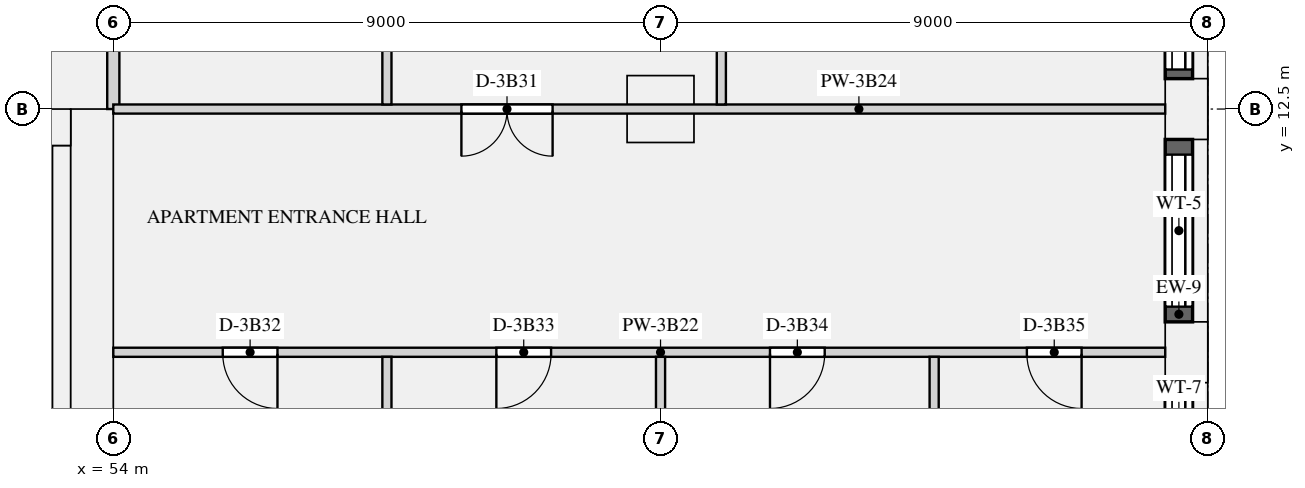
"""IFC4 building model, lengths in metres.
Left out: names, types, materials, properties, quantities, classifications, styles, units other than length and angle.
Written with IfcOpenShell. Run it as: python <this file> out.ifc"""

import sys

from ifc_helpers import new_model, si_unit, direction, frame, frame_2d, origin, origin_2d, place, context, subcontext, project, spatial, rectangle, extrude, element, fill, save


model = new_model("IFC4")
c1 = context("Model", 3, precision=1e-05, world=origin(), true_north=direction((0.0, 1.0)))
c2 = subcontext(c1, "Body", "Model", "MODEL_VIEW")
j1 = project(units=[si_unit("LENGTHUNIT", "METRE"), si_unit("PLANEANGLEUNIT", "RADIAN")], contexts=[c1])
p1 = place(None, origin())
s1 = spatial("IfcSite", under=j1, at=p1, CompositionType="ELEMENT")
p2 = place(p1, origin())
s2 = spatial("IfcBuilding", under=s1, at=p2, CompositionType="ELEMENT")
p3 = place(p2, frame((0.0, 0.0, 150.75)))
s3 = spatial("IfcBuildingStorey", under=s2, at=p3, CompositionType="ELEMENT", Elevation=150.75)
for number, where, z_axis, x_axis in (
    (1, (71.65, 8.5, 0.0), (0.0, 0.0, 1.0), (0.0, 1.0, 0.0)),
    (2, (71.65, 12.5, 0.0), (0.0, 0.0, 1.0), (0.0, 1.0, 0.0)),
):
    element("IfcColumn", number, at=place(p3, frame(where, z_axis=z_axis, x_axis=x_axis)), inside=s3, PredefinedType="USERDEFINED", context=c2, shape_type="SweptSolid", body=[
        extrude(rectangle(XDim=1.0, YDim=0.7, at=origin_2d()), origin(), (0.0, 0.0, 1.0), 3.15),
    ])
p4 = place(p3, frame((63.0, 12.5, 0.0), z_axis=(0.0, 0.0, 1.0), x_axis=(1.0, 0.0, 0.0)))
e3 = element("IfcColumn", 3, at=p4, inside=s3, PredefinedType="COLUMN", context=c2, shape_type="SweptSolid", body=[
    extrude(rectangle(XDim=1.1, YDim=1.1, at=origin_2d()), origin(), (0.0, 0.0, 1.0), 3.15),
])
p5 = place(p3, frame((53.65, 0.0, 0.0), z_axis=(0.0, 0.0, 1.0), x_axis=(0.0, 1.0, 0.0)))
e4 = element("IfcWall", 4, at=p5, inside=s3, PredefinedType="SHEAR", context=c2, shape_type="SweptSolid", body=[
    extrude(rectangle(XDim=12.5, YDim=0.7, at=frame_2d((6.25, 0.0))), origin(), (0.0, 0.0, 1.0), 3.15),
])
p6 = place(p3, frame((18.7, 12.2, 0.0), z_axis=(0.0, 0.0, 1.0), x_axis=(1.0, 0.0, 0.0)))
e5 = element("IfcWall", 5, at=p6, inside=s3, PredefinedType="SHEAR", context=c2, shape_type="SweptSolid", body=[
    extrude(rectangle(XDim=34.6, YDim=0.6, at=frame_2d((17.3, 0.0))), origin(), (0.0, 0.0, 1.0), 3.15),
])
p7 = place(p6, frame((24.475, 0.0, 0.0)))
e6 = element("IfcOpeningElement", 6, at=p7, cuts=e5, PredefinedType="OPENING", context=c2, shape_type="SweptSolid", body=[
    extrude(rectangle(XDim=1.1, YDim=2.1, at=frame_2d((0.55, 1.05))), frame((0.0, 0.31, 0.0), z_axis=(0.0, -1.0, 0.0), x_axis=(1.0, 0.0, 0.0)), (0.0, 0.0, 1.0), 0.62),
])
p8 = place(p6, frame((26.725, 0.0, 0.0)))
e7 = element("IfcOpeningElement", 7, at=p8, cuts=e5, PredefinedType="OPENING", context=c2, shape_type="SweptSolid", body=[
    extrude(rectangle(XDim=1.1, YDim=2.1, at=frame_2d((0.55, 1.05))), frame((0.0, 0.31, 0.0), z_axis=(0.0, -1.0, 0.0), x_axis=(1.0, 0.0, 0.0)), (0.0, 0.0, 1.0), 0.62),
])
p9 = place(p6, frame((28.975, 0.0, 0.0)))
e8 = element("IfcOpeningElement", 8, at=p9, cuts=e5, PredefinedType="OPENING", context=c2, shape_type="SweptSolid", body=[
    extrude(rectangle(XDim=1.1, YDim=2.1, at=frame_2d((0.55, 1.05))), frame((0.0, 0.31, 0.0), z_axis=(0.0, -1.0, 0.0), x_axis=(1.0, 0.0, 0.0)), (0.0, 0.0, 1.0), 0.62),
])
p10 = place(p6, frame((4.85, 0.0, 0.0)))
e9 = element("IfcOpeningElement", 9, at=p10, cuts=e5, PredefinedType="OPENING", context=c2, shape_type="SweptSolid", body=[
    extrude(rectangle(XDim=0.9, YDim=2.1, at=frame_2d((0.45, 1.05))), frame((0.0, 0.31, 0.0), z_axis=(0.0, -1.0, 0.0), x_axis=(1.0, 0.0, 0.0)), (0.0, 0.0, 1.0), 0.62),
])
p11 = place(p6, frame((18.35, 0.0, 0.0)))
e10 = element("IfcOpeningElement", 10, at=p11, cuts=e5, PredefinedType="OPENING", context=c2, shape_type="SweptSolid", body=[
    extrude(rectangle(XDim=0.9, YDim=2.1, at=frame_2d((0.45, 1.05))), frame((0.0, 0.31, 0.0), z_axis=(0.0, -1.0, 0.0), x_axis=(1.0, 0.0, 0.0)), (0.0, 0.0, 1.0), 0.62),
])
p12 = place(p6, frame((1.45, 0.0, 0.0)))
e11 = element("IfcOpeningElement", 11, at=p12, cuts=e5, PredefinedType="OPENING", context=c2, shape_type="SweptSolid", body=[
    extrude(rectangle(XDim=1.2, YDim=2.1, at=frame_2d((0.6, 1.05))), frame((0.0, 0.31, 0.0), z_axis=(0.0, -1.0, 0.0), x_axis=(1.0, 0.0, 0.0)), (0.0, 0.0, 1.0), 0.62),
])
p13 = place(p6, frame((31.95, 0.0, 0.0)))
e12 = element("IfcOpeningElement", 12, at=p13, cuts=e5, PredefinedType="OPENING", context=c2, shape_type="SweptSolid", body=[
    extrude(rectangle(XDim=1.2, YDim=2.1, at=frame_2d((0.6, 1.05))), frame((0.0, 0.31, 0.0), z_axis=(0.0, -1.0, 0.0), x_axis=(1.0, 0.0, 0.0)), (0.0, 0.0, 1.0), 0.62),
])
p14 = place(p3, frame((53.15, 1.0, 0.0), z_axis=(0.0, 0.0, 1.0), x_axis=(0.0, 1.0, 0.0)))
e13 = element("IfcWall", 13, at=p14, inside=s3, PredefinedType="SHEAR", context=c2, shape_type="SweptSolid", body=[
    extrude(rectangle(XDim=10.9, YDim=0.3, at=frame_2d((5.45, 0.0))), origin(), (0.0, 0.0, 1.0), 3.15),
])
p15 = place(p3, frame((71.525, 5.5, 0.9), z_axis=(0.0, 0.0, 1.0), x_axis=(0.0, 1.0, 0.0)))
e14 = element("IfcWall", 14, at=p15, inside=s3, PredefinedType="SOLIDWALL", context=c2, shape_type="SweptSolid", body=[
    extrude(rectangle(XDim=2.5, YDim=0.45, at=frame_2d((1.25, 0.0))), origin(), (0.0, 0.0, 1.0), 1.93),
])
p16 = place(p15, frame((0.25, 0.0, 0.15)))
e15 = element("IfcOpeningElement", 15, at=p16, cuts=e14, PredefinedType="OPENING", context=c2, shape_type="SweptSolid", body=[
    extrude(rectangle(XDim=2.0, YDim=1.5, at=frame_2d((1.0, 0.75))), frame((0.0, 0.235, 0.0), z_axis=(0.0, -1.0, 0.0), x_axis=(1.0, 0.0, 0.0)), (0.0, 0.0, 1.0), 0.47),
])
p17 = place(p3, frame((71.525, 9.0, 0.9), z_axis=(0.0, 0.0, 1.0), x_axis=(0.0, 1.0, 0.0)))
e16 = element("IfcWall", 16, at=p17, inside=s3, PredefinedType="SOLIDWALL", context=c2, shape_type="SweptSolid", body=[
    extrude(rectangle(XDim=3.0, YDim=0.45, at=frame_2d((1.5, 0.0))), origin(), (0.0, 0.0, 1.0), 1.93),
])
p18 = place(p17, frame((0.25, 0.0, 0.15)))
e17 = element("IfcOpeningElement", 17, at=p18, cuts=e16, PredefinedType="OPENING", context=c2, shape_type="SweptSolid", body=[
    extrude(rectangle(XDim=2.5, YDim=1.5, at=frame_2d((1.25, 0.75))), frame((0.0, 0.235, 0.0), z_axis=(0.0, -1.0, 0.0), x_axis=(1.0, 0.0, 0.0)), (0.0, 0.0, 1.0), 0.47),
])
p19 = place(p3, frame((71.525, 13.0, 0.9), z_axis=(0.0, 0.0, 1.0), x_axis=(0.0, 1.0, 0.0)))
e18 = element("IfcWall", 18, at=p19, inside=s3, PredefinedType="SOLIDWALL", context=c2, shape_type="SweptSolid", body=[
    extrude(rectangle(XDim=2.8, YDim=0.45, at=frame_2d((1.4, 0.0))), origin(), (0.0, 0.0, 1.0), 1.93),
])
p20 = place(p19, frame((0.15, 0.0, 0.15)))
e19 = element("IfcOpeningElement", 19, at=p20, cuts=e18, PredefinedType="OPENING", context=c2, shape_type="SweptSolid", body=[
    extrude(rectangle(XDim=2.5, YDim=1.5, at=frame_2d((1.25, 0.75))), frame((0.0, 0.235, 0.0), z_axis=(0.0, -1.0, 0.0), x_axis=(1.0, 0.0, 0.0)), (0.0, 0.0, 1.0), 0.47),
])
p21 = place(p3, frame((54.0, 12.5, 0.0), z_axis=(0.0, 0.0, 1.0), x_axis=(0.0, 1.0, 0.0)))
e20 = element("IfcWall", 20, at=p21, inside=s3, PredefinedType="PARTITIONING", context=c2, shape_type="SweptSolid", body=[
    extrude(rectangle(XDim=3.4, YDim=0.2, at=frame_2d((1.7, 0.0))), origin(), (0.0, 0.0, 1.0), 2.83),
])
p22 = place(p3, frame((54.0, 8.5, 0.0), z_axis=(0.0, 0.0, 1.0), x_axis=(1.0, 0.0, 0.0)))
e21 = element("IfcWall", 21, at=p22, inside=s3, PredefinedType="PARTITIONING", context=c2, shape_type="SweptSolid", body=[
    extrude(rectangle(XDim=17.3, YDim=0.15, at=frame_2d((8.65, 0.0))), origin(), (0.0, 0.0, 1.0), 2.83),
])
p23 = place(p22, frame((1.8, 0.0, 0.0)))
e22 = element("IfcOpeningElement", 22, at=p23, cuts=e21, PredefinedType="OPENING", context=c2, shape_type="SweptSolid", body=[
    extrude(rectangle(XDim=0.9, YDim=2.1, at=frame_2d((0.45, 1.05))), frame((0.0, 0.085, 0.0), z_axis=(0.0, -1.0, 0.0), x_axis=(1.0, 0.0, 0.0)), (0.0, 0.0, 1.0), 0.17),
])
p24 = place(p22, frame((6.3, 0.0, 0.0)))
e23 = element("IfcOpeningElement", 23, at=p24, cuts=e21, PredefinedType="OPENING", context=c2, shape_type="SweptSolid", body=[
    extrude(rectangle(XDim=0.9, YDim=2.1, at=frame_2d((0.45, 1.05))), frame((0.0, 0.085, 0.0), z_axis=(0.0, -1.0, 0.0), x_axis=(1.0, 0.0, 0.0)), (0.0, 0.0, 1.0), 0.17),
])
p25 = place(p22, frame((10.8, 0.0, 0.0)))
e24 = element("IfcOpeningElement", 24, at=p25, cuts=e21, PredefinedType="OPENING", context=c2, shape_type="SweptSolid", body=[
    extrude(rectangle(XDim=0.9, YDim=2.1, at=frame_2d((0.45, 1.05))), frame((0.0, 0.085, 0.0), z_axis=(0.0, -1.0, 0.0), x_axis=(1.0, 0.0, 0.0)), (0.0, 0.0, 1.0), 0.17),
])
p26 = place(p22, frame((15.025, 0.0, 0.0)))
e25 = element("IfcOpeningElement", 25, at=p26, cuts=e21, PredefinedType="OPENING", context=c2, shape_type="SweptSolid", body=[
    extrude(rectangle(XDim=0.9, YDim=2.1, at=frame_2d((0.45, 1.05))), frame((0.0, 0.085, 0.0), z_axis=(0.0, -1.0, 0.0), x_axis=(1.0, 0.0, 0.0)), (0.0, 0.0, 1.0), 0.17),
])
p27 = place(p3, frame((54.0, 12.5, 0.0), z_axis=(0.0, 0.0, 1.0), x_axis=(1.0, 0.0, 0.0)))
e26 = element("IfcWall", 26, at=p27, inside=s3, PredefinedType="PARTITIONING", context=c2, shape_type="SweptSolid", body=[
    extrude(rectangle(XDim=17.3, YDim=0.15, at=frame_2d((8.65, 0.0))), origin(), (0.0, 0.0, 1.0), 2.83),
])
p28 = place(p27, frame((5.725, 0.0, 0.0)))
e27 = element("IfcOpeningElement", 27, at=p28, cuts=e26, PredefinedType="OPENING", context=c2, shape_type="SweptSolid", body=[
    extrude(rectangle(XDim=1.5, YDim=2.1, at=frame_2d((0.75, 1.05))), frame((0.0, 0.085, 0.0), z_axis=(0.0, -1.0, 0.0), x_axis=(1.0, 0.0, 0.0)), (0.0, 0.0, 1.0), 0.17),
])
p29 = place(p3, frame((63.0, 0.7, 0.0), z_axis=(0.0, 0.0, 1.0), x_axis=(0.0, 1.0, 0.0)))
e28 = element("IfcWall", 28, at=p29, inside=s3, PredefinedType="PARTITIONING", context=c2, shape_type="SweptSolid", body=[
    extrude(rectangle(XDim=7.725, YDim=0.15, at=frame_2d((3.863, 0.0))), origin(), (0.0, 0.0, 1.0), 2.83),
])
p30 = place(p3, frame((64.0, 12.575, 0.0), z_axis=(0.0, 0.0, 1.0), x_axis=(0.0, 1.0, 0.0)))
e29 = element("IfcWall", 29, at=p30, inside=s3, PredefinedType="PARTITIONING", context=c2, shape_type="SweptSolid", body=[
    extrude(rectangle(XDim=22.85, YDim=0.15, at=frame_2d((11.425, 0.0))), origin(), (0.0, 0.0, 1.0), 2.83),
])
p31 = place(p30, frame((16.55, 0.0, 0.0)))
e30 = element("IfcOpeningElement", 30, at=p31, cuts=e29, PredefinedType="OPENING", context=c2, shape_type="SweptSolid", body=[
    extrude(rectangle(XDim=1.5, YDim=2.1, at=frame_2d((0.75, 1.05))), frame((0.0, 0.085, 0.0), z_axis=(0.0, -1.0, 0.0), x_axis=(1.0, 0.0, 0.0)), (0.0, 0.0, 1.0), 0.17),
])
p32 = place(p30, frame((4.925, 0.0, 0.0)))
e31 = element("IfcOpeningElement", 31, at=p32, cuts=e29, PredefinedType="OPENING", context=c2, shape_type="SweptSolid", body=[
    extrude(rectangle(XDim=1.5, YDim=2.1, at=frame_2d((0.75, 1.05))), frame((0.0, 0.085, 0.0), z_axis=(0.0, -1.0, 0.0), x_axis=(1.0, 0.0, 0.0)), (0.0, 0.0, 1.0), 0.17),
])
p33 = place(p3, frame((58.5, 0.7, 0.0), z_axis=(0.0, 0.0, 1.0), x_axis=(0.0, 1.0, 0.0)))
e32 = element("IfcWall", 32, at=p33, inside=s3, PredefinedType="PARTITIONING", context=c2, shape_type="SweptSolid", body=[
    extrude(rectangle(XDim=7.725, YDim=0.15, at=frame_2d((3.863, 0.0))), origin(), (0.0, 0.0, 1.0), 2.83),
])
p34 = place(p3, frame((58.5, 12.575, 0.0), z_axis=(0.0, 0.0, 1.0), x_axis=(0.0, 1.0, 0.0)))
e33 = element("IfcWall", 33, at=p34, inside=s3, PredefinedType="PARTITIONING", context=c2, shape_type="SweptSolid", body=[
    extrude(rectangle(XDim=10.325, YDim=0.15, at=frame_2d((5.163, 0.0))), origin(), (0.0, 0.0, 1.0), 2.83),
])
p35 = place(p34, frame((6.75, 0.0, 0.0)))
e34 = element("IfcOpeningElement", 34, at=p35, cuts=e33, PredefinedType="OPENING", context=c2, shape_type="SweptSolid", body=[
    extrude(rectangle(XDim=0.9, YDim=2.1, at=frame_2d((0.45, 1.05))), frame((0.0, 0.085, 0.0), z_axis=(0.0, -1.0, 0.0), x_axis=(1.0, 0.0, 0.0)), (0.0, 0.0, 1.0), 0.17),
])
p36 = place(p34, frame((1.475, 0.0, 0.0)))
e35 = element("IfcOpeningElement", 35, at=p36, cuts=e33, PredefinedType="OPENING", context=c2, shape_type="SweptSolid", body=[
    extrude(rectangle(XDim=0.9, YDim=2.1, at=frame_2d((0.45, 1.05))), frame((0.0, 0.085, 0.0), z_axis=(0.0, -1.0, 0.0), x_axis=(1.0, 0.0, 0.0)), (0.0, 0.0, 1.0), 0.17),
])
p37 = place(p3, frame((67.5, 5.2, 0.0), z_axis=(0.0, 0.0, 1.0), x_axis=(0.0, 1.0, 0.0)))
e36 = element("IfcWall", 36, at=p37, inside=s3, PredefinedType="PARTITIONING", context=c2, shape_type="SweptSolid", body=[
    extrude(rectangle(XDim=3.225, YDim=0.15, at=frame_2d((1.613, 0.0))), origin(), (0.0, 0.0, 1.0), 2.83),
])
p38 = place(p16, origin())
e37 = element("IfcWindow", 37, at=p38, inside=s3, PartitioningType="SINGLE_PANEL", PredefinedType="WINDOW", context=c2, shape_type="SweptSolid", body=[
    extrude(rectangle(XDim=2.0, YDim=1.5, at=frame_2d((1.0, 0.75))), frame((0.0, -0.065, 0.0), z_axis=(0.0, -1.0, 0.0), x_axis=(1.0, 0.0, 0.0)), (0.0, 0.0, 1.0), 0.06),
])
fill(e15, e37)
p39 = place(p18, origin())
e38 = element("IfcWindow", 38, at=p39, inside=s3, PartitioningType="SINGLE_PANEL", PredefinedType="WINDOW", context=c2, shape_type="SweptSolid", body=[
    extrude(rectangle(XDim=2.5, YDim=1.5, at=frame_2d((1.25, 0.75))), frame((0.0, -0.065, 0.0), z_axis=(0.0, -1.0, 0.0), x_axis=(1.0, 0.0, 0.0)), (0.0, 0.0, 1.0), 0.06),
])
fill(e17, e38)
p40 = place(p20, origin())
e39 = element("IfcWindow", 39, at=p40, inside=s3, PartitioningType="SINGLE_PANEL", PredefinedType="WINDOW", context=c2, shape_type="SweptSolid", body=[
    extrude(rectangle(XDim=2.5, YDim=1.5, at=frame_2d((1.25, 0.75))), frame((0.0, -0.065, 0.0), z_axis=(0.0, -1.0, 0.0), x_axis=(1.0, 0.0, 0.0)), (0.0, 0.0, 1.0), 0.06),
])
fill(e19, e39)
p41 = place(p28, frame((1.5, 0.0, 0.0), z_axis=(0.0, 0.0, 1.0), x_axis=(-1.0, 0.0, 0.0)))
e40 = element("IfcDoor", 40, at=p41, inside=s3, OperationType="DOUBLE_DOOR_SINGLE_SWING", PredefinedType="DOOR", context=c2, shape_type="SweptSolid", body=[
    extrude(rectangle(XDim=1.5, YDim=2.1, at=frame_2d((0.75, 1.05))), frame((0.0, 0.025, 0.0), z_axis=(0.0, -1.0, 0.0), x_axis=(1.0, 0.0, 0.0)), (0.0, 0.0, 1.0), 0.05),
])
fill(e27, e40)
p42 = place(p23, frame((0.9, 0.0, 0.0), z_axis=(0.0, 0.0, 1.0), x_axis=(-1.0, 0.0, 0.0)))
e41 = element("IfcDoor", 41, at=p42, inside=s3, OperationType="SINGLE_SWING_LEFT", PredefinedType="DOOR", context=c2, shape_type="SweptSolid", body=[
    extrude(rectangle(XDim=0.9, YDim=2.1, at=frame_2d((0.45, 1.05))), frame((0.0, 0.025, 0.0), z_axis=(0.0, -1.0, 0.0), x_axis=(1.0, 0.0, 0.0)), (0.0, 0.0, 1.0), 0.05),
])
fill(e22, e41)
p43 = place(p24, frame((0.9, 0.0, 0.0), z_axis=(0.0, 0.0, 1.0), x_axis=(-1.0, 0.0, 0.0)))
e42 = element("IfcDoor", 42, at=p43, inside=s3, OperationType="SINGLE_SWING_RIGHT", PredefinedType="DOOR", context=c2, shape_type="SweptSolid", body=[
    extrude(rectangle(XDim=0.9, YDim=2.1, at=frame_2d((0.45, 1.05))), frame((0.0, 0.025, 0.0), z_axis=(0.0, -1.0, 0.0), x_axis=(1.0, 0.0, 0.0)), (0.0, 0.0, 1.0), 0.05),
])
fill(e23, e42)
p44 = place(p25, frame((0.9, 0.0, 0.0), z_axis=(0.0, 0.0, 1.0), x_axis=(-1.0, 0.0, 0.0)))
e43 = element("IfcDoor", 43, at=p44, inside=s3, OperationType="SINGLE_SWING_RIGHT", PredefinedType="DOOR", context=c2, shape_type="SweptSolid", body=[
    extrude(rectangle(XDim=0.9, YDim=2.1, at=frame_2d((0.45, 1.05))), frame((0.0, 0.025, 0.0), z_axis=(0.0, -1.0, 0.0), x_axis=(1.0, 0.0, 0.0)), (0.0, 0.0, 1.0), 0.05),
])
fill(e24, e43)
p45 = place(p26, frame((0.9, 0.0, 0.0), z_axis=(0.0, 0.0, 1.0), x_axis=(-1.0, 0.0, 0.0)))
e44 = element("IfcDoor", 44, at=p45, inside=s3, OperationType="SINGLE_SWING_LEFT", PredefinedType="DOOR", context=c2, shape_type="SweptSolid", body=[
    extrude(rectangle(XDim=0.9, YDim=2.1, at=frame_2d((0.45, 1.05))), frame((0.0, 0.025, 0.0), z_axis=(0.0, -1.0, 0.0), x_axis=(1.0, 0.0, 0.0)), (0.0, 0.0, 1.0), 0.05),
])
fill(e25, e44)
save(model, sys.argv[1])
